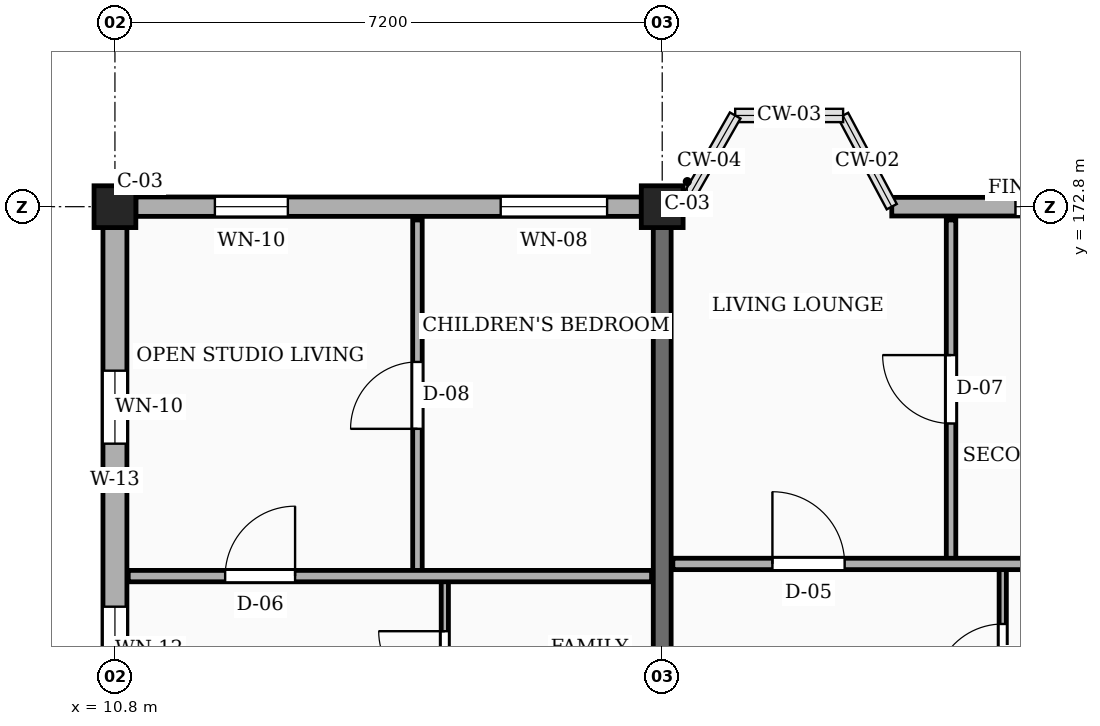
"""IFC4 building model, lengths in metres.
Left out: names, types, materials, properties, quantities, classifications, styles, units other than length and angle.
Written with IfcOpenShell. Run it as: python <this file> out.ifc"""

import sys

from ifc_helpers import new_model, si_unit, direction, frame, frame_2d, origin, origin_2d, place, context, subcontext, project, spatial, rectangle, extrude, element, fill, save


model = new_model("IFC4")
c1 = context("Model", 3, precision=1e-05, world=origin(), true_north=direction((0.0, 1.0)))
c2 = subcontext(c1, "Body", "Model", "MODEL_VIEW")
j1 = project(units=[si_unit("LENGTHUNIT", "METRE"), si_unit("PLANEANGLEUNIT", "RADIAN")], contexts=[c1])
p1 = place(None, origin())
s1 = spatial("IfcSite", under=j1, at=p1, CompositionType="ELEMENT")
p2 = place(p1, origin())
s2 = spatial("IfcBuilding", under=s1, at=p2, CompositionType="ELEMENT")
p3 = place(p2, frame((0.0, 0.0, 17.1)))
s3 = spatial("IfcBuildingStorey", under=s2, at=p3, CompositionType="ELEMENT", Elevation=17.1)
for number, where, z_axis, x_axis in (
    (1, (10.8, 172.8, 0.0), (0.0, 0.0, 1.0), (1.0, 0.0, 0.0)),
    (2, (18.0, 172.8, 0.0), (0.0, 0.0, 1.0), (1.0, 0.0, 0.0)),
):
    element("IfcColumn", number, at=place(p3, frame(where, z_axis=z_axis, x_axis=x_axis)), inside=s3, PredefinedType="COLUMN", context=c2, shape_type="SweptSolid", body=[
        extrude(rectangle(XDim=0.55, YDim=0.55, at=origin_2d()), origin(), (0.0, 0.0, 1.0), 3.15),
    ])
p4 = place(p3, frame((18.0, 165.925, 0.0), z_axis=(0.0, 0.0, 1.0), x_axis=(0.0, 1.0, 0.0)))
e3 = element("IfcWall", 3, at=p4, inside=s3, PredefinedType="SOLIDWALL", context=c2, shape_type="SweptSolid", body=[
    extrude(rectangle(XDim=6.6, YDim=0.235, at=frame_2d((3.3, 0.0))), origin(), (0.0, 0.0, 1.0), 2.185),
])
p5 = place(p3, frame((24.925, 172.8, 0.0), z_axis=(0.0, 0.0, 1.0), x_axis=(-1.0, 0.0, 0.0)))
e4 = element("IfcWall", 4, at=p5, inside=s3, PredefinedType="SOLIDWALL", context=c2, shape_type="SweptSolid", body=[
    extrude(rectangle(XDim=3.905, YDim=0.245, at=frame_2d((1.953, 0.0))), origin(), (0.0, 0.0, 1.0), 2.455),
])
p6 = place(p5, frame((0.958, 0.0, 0.78)))
e5 = element("IfcOpeningElement", 5, at=p6, cuts=e4, PredefinedType="OPENING", context=c2, shape_type="SweptSolid", body=[
    extrude(rectangle(XDim=1.32, YDim=1.15, at=frame_2d((0.66, 0.575))), frame((0.0, 0.133, 0.0), z_axis=(0.0, -1.0, 0.0), x_axis=(1.0, 0.0, 0.0)), (0.0, 0.0, 1.0), 0.265),
])
p7 = place(p3, frame((17.725, 172.8, 0.0), z_axis=(0.0, 0.0, 1.0), x_axis=(-1.0, 0.0, 0.0)))
e6 = element("IfcWall", 6, at=p7, inside=s3, PredefinedType="SOLIDWALL", context=c2, shape_type="SweptSolid", body=[
    extrude(rectangle(XDim=6.65, YDim=0.255, at=frame_2d((3.325, 0.0))), origin(), (0.0, 0.0, 1.0), 2.455),
])
p8 = place(p7, frame((0.45, 0.0, 0.78)))
e7 = element("IfcOpeningElement", 7, at=p8, cuts=e6, PredefinedType="OPENING", context=c2, shape_type="SweptSolid", body=[
    extrude(rectangle(XDim=1.4, YDim=1.15, at=frame_2d((0.7, 0.575))), frame((0.0, 0.137, 0.0), z_axis=(0.0, -1.0, 0.0), x_axis=(1.0, 0.0, 0.0)), (0.0, 0.0, 1.0), 0.275),
])
p9 = place(p7, frame((4.65, 0.0, 0.78)))
e8 = element("IfcOpeningElement", 8, at=p9, cuts=e6, PredefinedType="OPENING", context=c2, shape_type="SweptSolid", body=[
    extrude(rectangle(XDim=0.96, YDim=1.26, at=frame_2d((0.48, 0.63))), frame((0.0, 0.137, 0.0), z_axis=(0.0, -1.0, 0.0), x_axis=(1.0, 0.0, 0.0)), (0.0, 0.0, 1.0), 0.275),
])
p10 = place(p3, frame((10.8, 172.525, 0.0), z_axis=(0.0, 0.0, 1.0), x_axis=(0.0, -1.0, 0.0)))
e9 = element("IfcWall", 9, at=p10, inside=s3, PredefinedType="SOLIDWALL", context=c2, shape_type="SweptSolid", body=[
    extrude(rectangle(XDim=6.65, YDim=0.315, at=frame_2d((3.325, 0.0))), origin(), (0.0, 0.0, 1.0), 2.455),
])
p11 = place(p10, frame((1.883, 0.0, 0.78)))
e10 = element("IfcOpeningElement", 10, at=p11, cuts=e9, PredefinedType="OPENING", context=c2, shape_type="SweptSolid", body=[
    extrude(rectangle(XDim=0.96, YDim=1.26, at=frame_2d((0.48, 0.63))), frame((0.0, 0.167, 0.0), z_axis=(0.0, -1.0, 0.0), x_axis=(1.0, 0.0, 0.0)), (0.0, 0.0, 1.0), 0.335),
])
p12 = place(p10, frame((4.988, 0.0, 0.78)))
e11 = element("IfcOpeningElement", 11, at=p12, cuts=e9, PredefinedType="OPENING", context=c2, shape_type="SweptSolid", body=[
    extrude(rectangle(XDim=1.12, YDim=1.26, at=frame_2d((0.56, 0.63))), frame((0.0, 0.167, 0.0), z_axis=(0.0, -1.0, 0.0), x_axis=(1.0, 0.0, 0.0)), (0.0, 0.0, 1.0), 0.335),
])
p13 = place(p3, frame((14.78, 168.01, 0.0), z_axis=(0.0, 0.0, 1.0), x_axis=(0.0, 1.0, 0.0)))
e12 = element("IfcWall", 12, at=p13, inside=s3, PredefinedType="PARTITIONING", context=c2, shape_type="SweptSolid", body=[
    extrude(rectangle(XDim=4.615, YDim=0.125, at=frame_2d((2.308, 0.0))), origin(), (0.0, 0.0, 1.0), 2.32),
])
p14 = place(p13, frame((1.867, 0.0, 0.0)))
e13 = element("IfcOpeningElement", 13, at=p14, cuts=e12, PredefinedType="OPENING", context=c2, shape_type="SweptSolid", body=[
    extrude(rectangle(XDim=0.88, YDim=2.08, at=frame_2d((0.44, 1.04))), frame((0.0, 0.073, 0.0), z_axis=(0.0, -1.0, 0.0), x_axis=(1.0, 0.0, 0.0)), (0.0, 0.0, 1.0), 0.145),
])
p15 = place(p3, frame((15.14, 165.69, 0.0), z_axis=(0.0, 0.0, 1.0), x_axis=(0.0, 1.0, 0.0)))
e14 = element("IfcWall", 14, at=p15, inside=s3, PredefinedType="PARTITIONING", context=c2, shape_type="SweptSolid", body=[
    extrude(rectangle(XDim=2.18, YDim=0.095, at=frame_2d((1.09, 0.0))), origin(), (0.0, 0.0, 1.0), 2.32),
])
p16 = place(p15, frame((0.655, 0.0, 0.0)))
e15 = element("IfcOpeningElement", 15, at=p16, cuts=e14, PredefinedType="OPENING", context=c2, shape_type="SweptSolid", body=[
    extrude(rectangle(XDim=0.87, YDim=2.05, at=frame_2d((0.435, 1.025))), frame((0.0, 0.058, 0.0), z_axis=(0.0, -1.0, 0.0), x_axis=(1.0, 0.0, 0.0)), (0.0, 0.0, 1.0), 0.115),
])
p17 = place(p3, frame((10.975, 167.94, 0.0), z_axis=(0.0, 0.0, 1.0), x_axis=(1.0, 0.0, 0.0)))
e16 = element("IfcWall", 16, at=p17, inside=s3, PredefinedType="PARTITIONING", context=c2, shape_type="SweptSolid", body=[
    extrude(rectangle(XDim=6.885, YDim=0.15, at=frame_2d((3.442, 0.0))), origin(), (0.0, 0.0, 1.0), 2.32),
])
p18 = place(p17, frame((1.275, 0.0, 0.0)))
e17 = element("IfcOpeningElement", 17, at=p18, cuts=e16, PredefinedType="OPENING", context=c2, shape_type="SweptSolid", body=[
    extrude(rectangle(XDim=0.92, YDim=2.1, at=frame_2d((0.46, 1.05))), frame((0.0, 0.085, 0.0), z_axis=(0.0, -1.0, 0.0), x_axis=(1.0, 0.0, 0.0)), (0.0, 0.0, 1.0), 0.17),
])
p19 = place(p3, frame((21.8, 168.17, 0.0), z_axis=(0.0, 0.0, 1.0), x_axis=(0.0, 1.0, 0.0)))
e18 = element("IfcWall", 18, at=p19, inside=s3, PredefinedType="PARTITIONING", context=c2, shape_type="SweptSolid", body=[
    extrude(rectangle(XDim=4.455, YDim=0.125, at=frame_2d((2.228, 0.0))), origin(), (0.0, 0.0, 1.0), 2.32),
])
p20 = place(p19, frame((1.778, 0.0, 0.0)))
e19 = element("IfcOpeningElement", 19, at=p20, cuts=e18, PredefinedType="OPENING", context=c2, shape_type="SweptSolid", body=[
    extrude(rectangle(XDim=0.9, YDim=2.1, at=frame_2d((0.45, 1.05))), frame((0.0, 0.073, 0.0), z_axis=(0.0, -1.0, 0.0), x_axis=(1.0, 0.0, 0.0)), (0.0, 0.0, 1.0), 0.145),
])
p21 = place(p3, frame((22.48, 165.69, 0.0), z_axis=(0.0, 0.0, 1.0), x_axis=(0.0, 1.0, 0.0)))
e20 = element("IfcWall", 20, at=p21, inside=s3, PredefinedType="PARTITIONING", context=c2, shape_type="SweptSolid", body=[
    extrude(rectangle(XDim=2.34, YDim=0.095, at=frame_2d((1.17, 0.0))), origin(), (0.0, 0.0, 1.0), 2.32),
])
p22 = place(p21, frame((0.72, 0.0, 0.0)))
e21 = element("IfcOpeningElement", 21, at=p22, cuts=e20, PredefinedType="OPENING", context=c2, shape_type="SweptSolid", body=[
    extrude(rectangle(XDim=0.9, YDim=2.05, at=frame_2d((0.45, 1.025))), frame((0.0, 0.058, 0.0), z_axis=(0.0, -1.0, 0.0), x_axis=(1.0, 0.0, 0.0)), (0.0, 0.0, 1.0), 0.115),
])
p23 = place(p3, frame((18.14, 168.1, 0.0), z_axis=(0.0, 0.0, 1.0), x_axis=(1.0, 0.0, 0.0)))
e22 = element("IfcWall", 22, at=p23, inside=s3, PredefinedType="PARTITIONING", context=c2, shape_type="SweptSolid", body=[
    extrude(rectangle(XDim=6.92, YDim=0.15, at=frame_2d((3.46, 0.0))), origin(), (0.0, 0.0, 1.0), 2.32),
])
p24 = place(p23, frame((1.31, 0.0, 0.0)))
e23 = element("IfcOpeningElement", 23, at=p24, cuts=e22, PredefinedType="OPENING", context=c2, shape_type="SweptSolid", body=[
    extrude(rectangle(XDim=0.95, YDim=2.1, at=frame_2d((0.475, 1.05))), frame((0.0, 0.085, 0.0), z_axis=(0.0, -1.0, 0.0), x_axis=(1.0, 0.0, 0.0)), (0.0, 0.0, 1.0), 0.17),
])
p25 = place(p6, origin())
e24 = element("IfcWindow", 24, at=p25, inside=s3, PartitioningType="SINGLE_PANEL", PredefinedType="WINDOW", context=c2, shape_type="SweptSolid", body=[
    extrude(rectangle(XDim=1.32, YDim=1.15, at=frame_2d((0.66, 0.575))), frame((0.0, 0.03, 0.0), z_axis=(0.0, -1.0, 0.0), x_axis=(1.0, 0.0, 0.0)), (0.0, 0.0, 1.0), 0.06),
])
fill(e5, e24)
p26 = place(p8, origin())
e25 = element("IfcWindow", 25, at=p26, inside=s3, PartitioningType="SINGLE_PANEL", PredefinedType="WINDOW", context=c2, shape_type="SweptSolid", body=[
    extrude(rectangle(XDim=1.4, YDim=1.15, at=frame_2d((0.7, 0.575))), frame((0.0, 0.03, 0.0), z_axis=(0.0, -1.0, 0.0), x_axis=(1.0, 0.0, 0.0)), (0.0, 0.0, 1.0), 0.06),
])
fill(e7, e25)
p27 = place(p9, origin())
e26 = element("IfcWindow", 26, at=p27, inside=s3, PartitioningType="SINGLE_PANEL", PredefinedType="WINDOW", context=c2, shape_type="SweptSolid", body=[
    extrude(rectangle(XDim=0.96, YDim=1.26, at=frame_2d((0.48, 0.63))), frame((0.0, 0.03, 0.0), z_axis=(0.0, -1.0, 0.0), x_axis=(1.0, 0.0, 0.0)), (0.0, 0.0, 1.0), 0.06),
])
fill(e8, e26)
p28 = place(p11, origin())
e27 = element("IfcWindow", 27, at=p28, inside=s3, PartitioningType="SINGLE_PANEL", PredefinedType="WINDOW", context=c2, shape_type="SweptSolid", body=[
    extrude(rectangle(XDim=0.96, YDim=1.26, at=frame_2d((0.48, 0.63))), frame((0.0, 0.03, 0.0), z_axis=(0.0, -1.0, 0.0), x_axis=(1.0, 0.0, 0.0)), (0.0, 0.0, 1.0), 0.06),
])
fill(e10, e27)
p29 = place(p12, origin())
e28 = element("IfcWindow", 28, at=p29, inside=s3, PartitioningType="SINGLE_PANEL", PredefinedType="WINDOW", context=c2, shape_type="SweptSolid", body=[
    extrude(rectangle(XDim=1.12, YDim=1.26, at=frame_2d((0.56, 0.63))), frame((0.0, 0.03, 0.0), z_axis=(0.0, -1.0, 0.0), x_axis=(1.0, 0.0, 0.0)), (0.0, 0.0, 1.0), 0.06),
])
fill(e11, e28)
p30 = place(p14, origin())
e29 = element("IfcDoor", 29, at=p30, inside=s3, OperationType="SINGLE_SWING_LEFT", PredefinedType="DOOR", context=c2, shape_type="SweptSolid", body=[
    extrude(rectangle(XDim=0.88, YDim=2.08, at=frame_2d((0.44, 1.04))), frame((0.0, 0.025, 0.0), z_axis=(0.0, -1.0, 0.0), x_axis=(1.0, 0.0, 0.0)), (0.0, 0.0, 1.0), 0.05),
])
fill(e13, e29)
p31 = place(p16, origin())
e30 = element("IfcDoor", 30, at=p31, inside=s3, OperationType="SINGLE_SWING_RIGHT", PredefinedType="DOOR", context=c2, shape_type="SweptSolid", body=[
    extrude(rectangle(XDim=0.87, YDim=2.05, at=frame_2d((0.435, 1.025))), frame((0.0, 0.025, 0.0), z_axis=(0.0, -1.0, 0.0), x_axis=(1.0, 0.0, 0.0)), (0.0, 0.0, 1.0), 0.05),
])
fill(e15, e30)
p32 = place(p18, origin())
e31 = element("IfcDoor", 31, at=p32, inside=s3, OperationType="SINGLE_SWING_RIGHT", PredefinedType="DOOR", context=c2, shape_type="SweptSolid", body=[
    extrude(rectangle(XDim=0.92, YDim=2.1, at=frame_2d((0.46, 1.05))), frame((0.0, 0.025, 0.0), z_axis=(0.0, -1.0, 0.0), x_axis=(1.0, 0.0, 0.0)), (0.0, 0.0, 1.0), 0.05),
])
fill(e17, e31)
p33 = place(p20, origin())
e32 = element("IfcDoor", 32, at=p33, inside=s3, OperationType="SINGLE_SWING_RIGHT", PredefinedType="DOOR", context=c2, shape_type="SweptSolid", body=[
    extrude(rectangle(XDim=0.9, YDim=2.1, at=frame_2d((0.45, 1.05))), frame((0.0, 0.025, 0.0), z_axis=(0.0, -1.0, 0.0), x_axis=(1.0, 0.0, 0.0)), (0.0, 0.0, 1.0), 0.05),
])
fill(e19, e32)
p34 = place(p22, origin())
e33 = element("IfcDoor", 33, at=p34, inside=s3, OperationType="SINGLE_SWING_LEFT", PredefinedType="DOOR", context=c2, shape_type="SweptSolid", body=[
    extrude(rectangle(XDim=0.9, YDim=2.05, at=frame_2d((0.45, 1.025))), frame((0.0, 0.025, 0.0), z_axis=(0.0, -1.0, 0.0), x_axis=(1.0, 0.0, 0.0)), (0.0, 0.0, 1.0), 0.05),
])
fill(e21, e33)
p35 = place(p24, origin())
e34 = element("IfcDoor", 34, at=p35, inside=s3, OperationType="SINGLE_SWING_LEFT", PredefinedType="DOOR", context=c2, shape_type="SweptSolid", body=[
    extrude(rectangle(XDim=0.95, YDim=2.1, at=frame_2d((0.475, 1.05))), frame((0.0, 0.025, 0.0), z_axis=(0.0, -1.0, 0.0), x_axis=(1.0, 0.0, 0.0)), (0.0, 0.0, 1.0), 0.05),
])
fill(e23, e34)
save(model, sys.argv[1])
